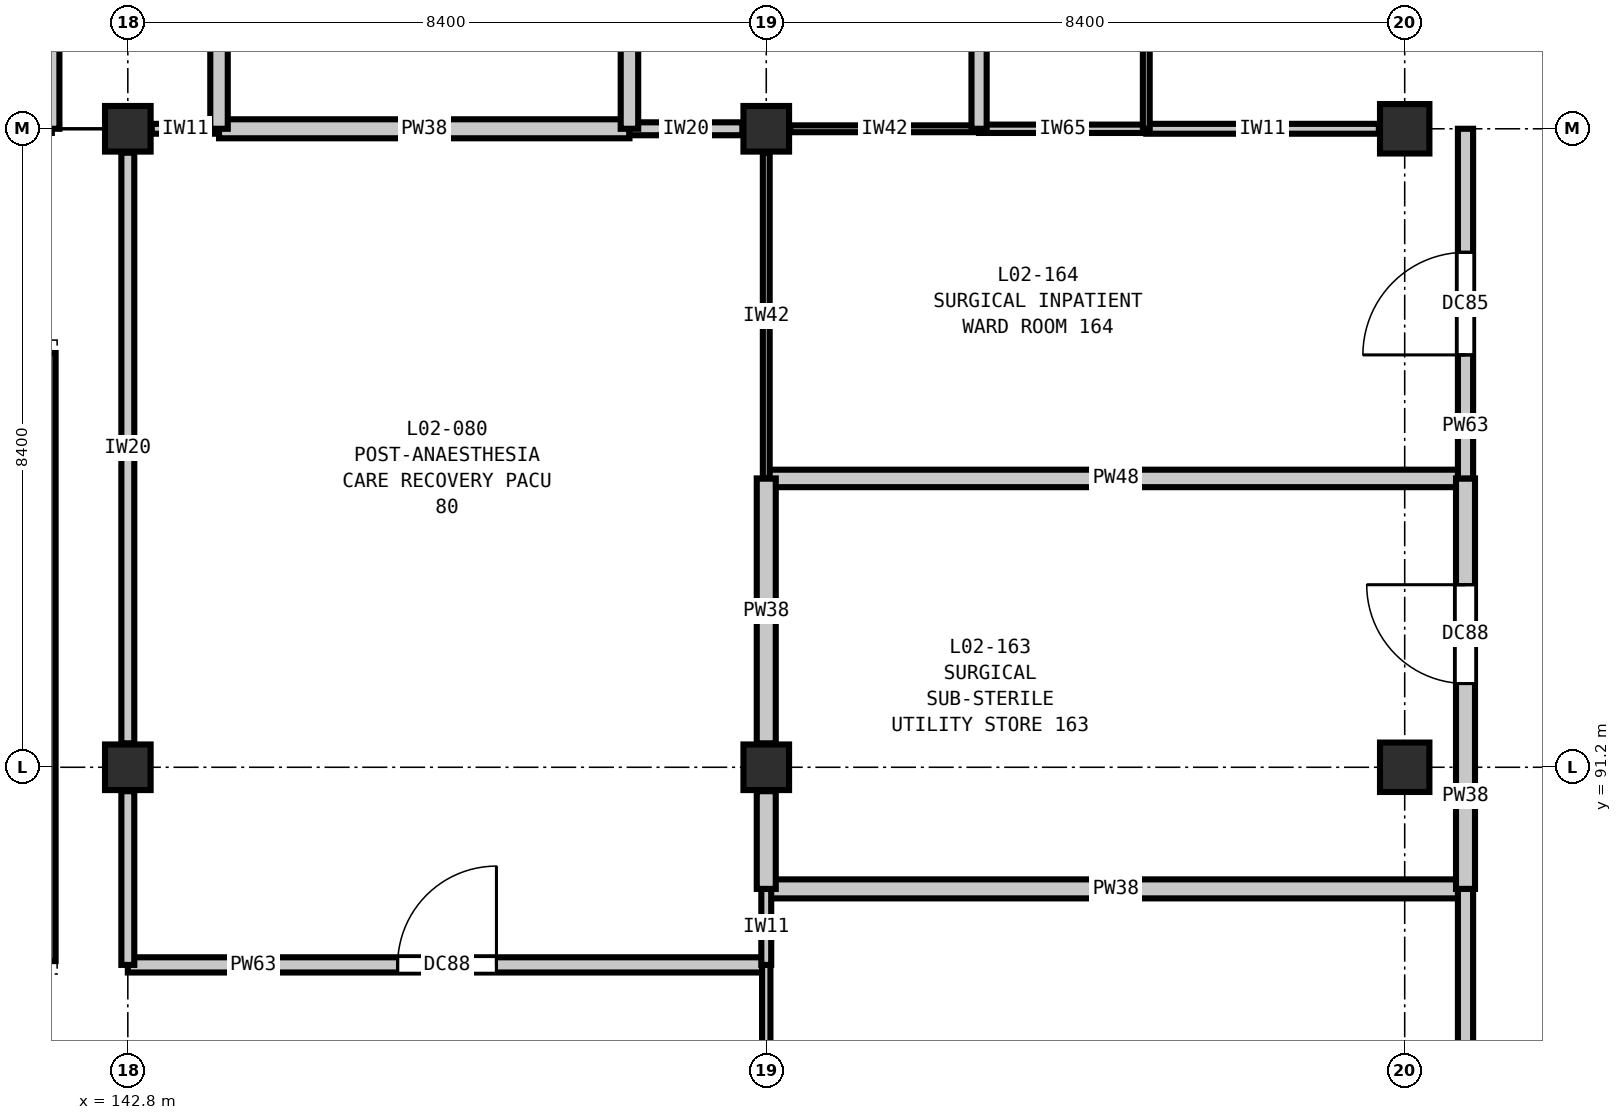
"""IFC4 building model, lengths in metres.
Left out: names, types, materials, properties, quantities, classifications, styles, units other than length and angle.
Written with IfcOpenShell. Run it as: python <this file> out.ifc"""

import sys

from ifc_helpers import new_model, si_unit, direction, frame, frame_2d, origin, origin_2d, place, context, subcontext, project, spatial, rectangle, extrude, element, fill, save


model = new_model("IFC4")
c1 = context("Model", 3, precision=1e-05, world=origin(), true_north=direction((0.0, 1.0)))
c2 = subcontext(c1, "Body", "Model", "MODEL_VIEW")
j1 = project(units=[si_unit("LENGTHUNIT", "METRE"), si_unit("PLANEANGLEUNIT", "RADIAN")], contexts=[c1])
p1 = place(None, origin())
s1 = spatial("IfcSite", under=j1, at=p1, CompositionType="ELEMENT")
p2 = place(p1, origin())
s2 = spatial("IfcBuilding", under=s1, at=p2, CompositionType="ELEMENT")
p3 = place(p2, frame((0.0, 0.0, 10.8)))
s3 = spatial("IfcBuildingStorey", under=s2, at=p3, CompositionType="ELEMENT", Elevation=10.8)
for number, where, z_axis, x_axis in (
    (1, (142.8, 91.2, 0.0), (0.0, 0.0, 1.0), (1.0, 0.0, 0.0)),
    (2, (142.8, 99.6, 0.0), (0.0, 0.0, 1.0), (1.0, 0.0, 0.0)),
    (3, (151.2, 91.2, 0.0), (0.0, 0.0, 1.0), (1.0, 0.0, 0.0)),
    (4, (151.2, 99.6, 0.0), (0.0, 0.0, 1.0), (1.0, 0.0, 0.0)),
):
    element("IfcColumn", number, at=place(p3, frame(where, z_axis=z_axis, x_axis=x_axis)), inside=s3, PredefinedType="COLUMN", context=c2, shape_type="SweptSolid", body=[
        extrude(rectangle(XDim=0.6, YDim=0.6, at=origin_2d()), origin(), (0.0, 0.0, 1.0), 5.4),
    ])
for number, where, z_axis, x_axis in (
    (5, (159.6, 91.2, 0.0), (0.0, 0.0, 1.0), (1.0, 0.0, 0.0)),
    (6, (159.6, 99.6, 0.0), (0.0, 0.0, 1.0), (1.0, 0.0, 0.0)),
):
    element("IfcColumn", number, at=place(p3, frame(where, z_axis=z_axis, x_axis=x_axis)), inside=s3, PredefinedType="COLUMN", context=c2, shape_type="SweptSolid", body=[
        extrude(rectangle(XDim=0.65, YDim=0.65, at=origin_2d()), origin(), (0.0, 0.0, 1.0), 5.4),
    ])
p4 = place(p3, frame((141.7, 88.65, 0.0), z_axis=(0.0, 0.0, 1.0), x_axis=(0.0, 1.0, 0.0)))
e7 = element("IfcWall", 7, at=p4, inside=s3, PredefinedType="SHEAR", context=c2, shape_type="SweptSolid", body=[
    extrude(rectangle(XDim=8.0, YDim=0.3, at=frame_2d((4.0, 0.0))), origin(), (0.0, 0.0, 1.0), 5.4),
])
p5 = place(p3, frame((142.8, 88.6, 0.0), z_axis=(0.0, 0.0, 1.0), x_axis=(1.0, 0.0, 0.0)))
e8 = element("IfcWall", 8, at=p5, inside=s3, PredefinedType="PARTITIONING", context=c2, shape_type="SweptSolid", body=[
    extrude(rectangle(XDim=8.4, YDim=0.2, at=frame_2d((4.2, 0.0))), origin(), (0.0, 0.0, 1.0), 5.07),
])
p6 = place(p5, frame((3.55, 0.0, 0.0)))
e9 = element("IfcOpeningElement", 9, at=p6, cuts=e8, PredefinedType="OPENING", context=c2, shape_type="SweptSolid", body=[
    extrude(rectangle(XDim=1.3, YDim=2.2, at=frame_2d((0.65, 1.1))), frame((0.0, 0.11, 0.0), z_axis=(0.0, -1.0, 0.0), x_axis=(1.0, 0.0, 0.0)), (0.0, 0.0, 1.0), 0.22),
])
p7 = place(p3, frame((151.2, 89.6, 0.0), z_axis=(0.0, 0.0, 1.0), x_axis=(1.0, 0.0, 0.0)))
e10 = element("IfcWall", 10, at=p7, inside=s3, PredefinedType="PARTITIONING", context=c2, shape_type="SweptSolid", body=[
    extrude(rectangle(XDim=9.2, YDim=0.25, at=frame_2d((4.6, 0.0))), origin(), (0.0, 0.0, 1.0), 5.07),
])
p8 = place(p3, frame((151.2, 95.0, 0.0), z_axis=(0.0, 0.0, 1.0), x_axis=(1.0, 0.0, 0.0)))
e11 = element("IfcWall", 11, at=p8, inside=s3, PredefinedType="PARTITIONING", context=c2, shape_type="SweptSolid", body=[
    extrude(rectangle(XDim=9.2, YDim=0.23, at=frame_2d((4.6, 0.0))), origin(), (0.0, 0.0, 1.0), 5.07),
])
p9 = place(p3, frame((143.115, 99.6, 0.0), z_axis=(0.0, 0.0, 1.0), x_axis=(1.0, 0.0, 0.0)))
e12 = element("IfcWall", 12, at=p9, inside=s3, PredefinedType="PARTITIONING", context=c2, shape_type="SweptSolid", body=[
    extrude(rectangle(XDim=0.885, YDim=0.13, at=frame_2d((0.442, 0.0))), origin(), (0.0, 0.0, 1.0), 4.735),
])
p10 = place(p3, frame((144.0, 99.6, 0.0), z_axis=(0.0, 0.0, 1.0), x_axis=(1.0, 0.0, 0.0)))
e13 = element("IfcWall", 13, at=p10, inside=s3, PredefinedType="PARTITIONING", context=c2, shape_type="SweptSolid", body=[
    extrude(rectangle(XDim=5.4, YDim=0.25, at=frame_2d((2.7, 0.0))), origin(), (0.0, 0.0, 1.0), 4.735),
])
p11 = place(p3, frame((149.4, 99.6, 0.0), z_axis=(0.0, 0.0, 1.0), x_axis=(1.0, 0.0, 0.0)))
e14 = element("IfcWall", 14, at=p11, inside=s3, PredefinedType="PARTITIONING", context=c2, shape_type="SweptSolid", body=[
    extrude(rectangle(XDim=1.485, YDim=0.17, at=frame_2d((0.743, 0.0))), origin(), (0.0, 0.0, 1.0), 4.735),
])
p12 = place(p3, frame((151.515, 99.6, 0.0), z_axis=(0.0, 0.0, 1.0), x_axis=(1.0, 0.0, 0.0)))
e15 = element("IfcWall", 15, at=p12, inside=s3, PredefinedType="PARTITIONING", context=c2, shape_type="SweptSolid", body=[
    extrude(rectangle(XDim=2.485, YDim=0.09, at=frame_2d((1.243, 0.0))), origin(), (0.0, 0.0, 1.0), 4.735),
])
p13 = place(p3, frame((154.0, 99.6, 0.0), z_axis=(0.0, 0.0, 1.0), x_axis=(1.0, 0.0, 0.0)))
e16 = element("IfcWall", 16, at=p13, inside=s3, PredefinedType="PARTITIONING", context=c2, shape_type="SweptSolid", body=[
    extrude(rectangle(XDim=2.2, YDim=0.11, at=frame_2d((1.1, 0.0))), origin(), (0.0, 0.0, 1.0), 4.735),
])
p14 = place(p3, frame((156.2, 99.6, 0.0), z_axis=(0.0, 0.0, 1.0), x_axis=(1.0, 0.0, 0.0)))
e17 = element("IfcWall", 17, at=p14, inside=s3, PredefinedType="PARTITIONING", context=c2, shape_type="SweptSolid", body=[
    extrude(rectangle(XDim=3.06, YDim=0.13, at=frame_2d((1.53, 0.0))), origin(), (0.0, 0.0, 1.0), 4.735),
])
p15 = place(p3, frame((141.8, 99.6, 0.0), z_axis=(0.0, 0.0, 1.0), x_axis=(0.0, 1.0, 0.0)))
e18 = element("IfcWall", 18, at=p15, inside=s3, PredefinedType="PARTITIONING", context=c2, shape_type="SweptSolid", body=[
    extrude(rectangle(XDim=6.8, YDim=0.2, at=frame_2d((3.4, 0.0))), origin(), (0.0, 0.0, 1.0), 5.07),
])
p16 = place(p15, frame((3.936, 0.0, 0.0)))
e19 = element("IfcOpeningElement", 19, at=p16, cuts=e18, PredefinedType="OPENING", context=c2, shape_type="SweptSolid", body=[
    extrude(rectangle(XDim=1.7, YDim=2.3, at=frame_2d((0.85, 1.15))), frame((0.0, 0.11, 0.0), z_axis=(0.0, -1.0, 0.0), x_axis=(1.0, 0.0, 0.0)), (0.0, 0.0, 1.0), 0.22),
])
p17 = place(p3, frame((142.8, 91.515, 0.0), z_axis=(0.0, 0.0, 1.0), x_axis=(0.0, 1.0, 0.0)))
e20 = element("IfcWall", 20, at=p17, inside=s3, PredefinedType="PARTITIONING", context=c2, shape_type="SweptSolid", body=[
    extrude(rectangle(XDim=7.77, YDim=0.17, at=frame_2d((3.885, 0.0))), origin(), (0.0, 0.0, 1.0), 4.735),
])
p18 = place(p3, frame((142.8, 88.6, 0.0), z_axis=(0.0, 0.0, 1.0), x_axis=(0.0, 1.0, 0.0)))
e21 = element("IfcWall", 21, at=p18, inside=s3, PredefinedType="PARTITIONING", context=c2, shape_type="SweptSolid", body=[
    extrude(rectangle(XDim=2.285, YDim=0.17, at=frame_2d((1.143, 0.0))), origin(), (0.0, 0.0, 1.0), 4.735),
])
p19 = place(p3, frame((144.0, 99.6, 0.0), z_axis=(0.0, 0.0, 1.0), x_axis=(0.0, 1.0, 0.0)))
e22 = element("IfcWall", 22, at=p19, inside=s3, PredefinedType="PARTITIONING", context=c2, shape_type="SweptSolid", body=[
    extrude(rectangle(XDim=6.8, YDim=0.23, at=frame_2d((3.4, 0.0))), origin(), (0.0, 0.0, 1.0), 5.07),
])
p20 = place(p3, frame((149.4, 99.6, 0.0), z_axis=(0.0, 0.0, 1.0), x_axis=(0.0, 1.0, 0.0)))
e23 = element("IfcWall", 23, at=p20, inside=s3, PredefinedType="PARTITIONING", context=c2, shape_type="SweptSolid", body=[
    extrude(rectangle(XDim=13.6, YDim=0.23, at=frame_2d((6.8, 0.0))), origin(), (0.0, 0.0, 1.0), 5.07),
])
p21 = place(p3, frame((151.2, 85.8, 0.0), z_axis=(0.0, 0.0, 1.0), x_axis=(0.0, 1.0, 0.0)))
e24 = element("IfcWall", 24, at=p21, inside=s3, PredefinedType="PARTITIONING", context=c2, shape_type="SweptSolid", body=[
    extrude(rectangle(XDim=2.8, YDim=0.11, at=frame_2d((1.4, 0.0))), origin(), (0.0, 0.0, 1.0), 4.735),
])
p22 = place(p3, frame((151.2, 88.6, 0.0), z_axis=(0.0, 0.0, 1.0), x_axis=(0.0, 1.0, 0.0)))
e25 = element("IfcWall", 25, at=p22, inside=s3, PredefinedType="PARTITIONING", context=c2, shape_type="SweptSolid", body=[
    extrude(rectangle(XDim=1.0, YDim=0.13, at=frame_2d((0.5, 0.0))), origin(), (0.0, 0.0, 1.0), 4.735),
])
p23 = place(p3, frame((151.2, 91.515, 0.0), z_axis=(0.0, 0.0, 1.0), x_axis=(0.0, 1.0, 0.0)))
e26 = element("IfcWall", 26, at=p23, inside=s3, PredefinedType="PARTITIONING", context=c2, shape_type="SweptSolid", body=[
    extrude(rectangle(XDim=3.485, YDim=0.25, at=frame_2d((1.743, 0.0))), origin(), (0.0, 0.0, 1.0), 4.735),
])
p24 = place(p3, frame((151.2, 89.6, 0.0), z_axis=(0.0, 0.0, 1.0), x_axis=(0.0, 1.0, 0.0)))
e27 = element("IfcWall", 27, at=p24, inside=s3, PredefinedType="PARTITIONING", context=c2, shape_type="SweptSolid", body=[
    extrude(rectangle(XDim=1.285, YDim=0.25, at=frame_2d((0.643, 0.0))), origin(), (0.0, 0.0, 1.0), 4.735),
])
p25 = place(p3, frame((151.2, 95.0, 0.0), z_axis=(0.0, 0.0, 1.0), x_axis=(0.0, 1.0, 0.0)))
e28 = element("IfcWall", 28, at=p25, inside=s3, PredefinedType="PARTITIONING", context=c2, shape_type="SweptSolid", body=[
    extrude(rectangle(XDim=4.285, YDim=0.09, at=frame_2d((2.143, 0.0))), origin(), (0.0, 0.0, 1.0), 4.735),
])
p26 = place(p3, frame((154.0, 99.6, 0.0), z_axis=(0.0, 0.0, 1.0), x_axis=(0.0, 1.0, 0.0)))
e29 = element("IfcWall", 29, at=p26, inside=s3, PredefinedType="PARTITIONING", context=c2, shape_type="SweptSolid", body=[
    extrude(rectangle(XDim=6.8, YDim=0.2, at=frame_2d((3.4, 0.0))), origin(), (0.0, 0.0, 1.0), 5.07),
])
p27 = place(p26, frame((2.775, 0.0, 0.0)))
e30 = element("IfcOpeningElement", 30, at=p27, cuts=e29, PredefinedType="OPENING", context=c2, shape_type="SweptSolid", body=[
    extrude(rectangle(XDim=1.25, YDim=2.15, at=frame_2d((0.625, 1.075))), frame((0.0, 0.11, 0.0), z_axis=(0.0, -1.0, 0.0), x_axis=(1.0, 0.0, 0.0)), (0.0, 0.0, 1.0), 0.22),
])
p28 = place(p3, frame((156.2, 99.6, 0.0), z_axis=(0.0, 0.0, 1.0), x_axis=(0.0, 1.0, 0.0)))
e31 = element("IfcWall", 31, at=p28, inside=s3, PredefinedType="PARTITIONING", context=c2, shape_type="SweptSolid", body=[
    extrude(rectangle(XDim=6.8, YDim=0.09, at=frame_2d((3.4, 0.0))), origin(), (0.0, 0.0, 1.0), 5.07),
])
p29 = place(p3, frame((160.4, 82.8, 0.0), z_axis=(0.0, 0.0, 1.0), x_axis=(0.0, 1.0, 0.0)))
e32 = element("IfcWall", 32, at=p29, inside=s3, PredefinedType="PARTITIONING", context=c2, shape_type="SweptSolid", body=[
    extrude(rectangle(XDim=6.8, YDim=0.2, at=frame_2d((3.4, 0.0))), origin(), (0.0, 0.0, 1.0), 5.07),
])
p30 = place(p29, frame((2.775, 0.0, 0.0)))
e33 = element("IfcOpeningElement", 33, at=p30, cuts=e32, PredefinedType="OPENING", context=c2, shape_type="SweptSolid", body=[
    extrude(rectangle(XDim=1.25, YDim=2.15, at=frame_2d((0.625, 1.075))), frame((0.0, 0.11, 0.0), z_axis=(0.0, -1.0, 0.0), x_axis=(1.0, 0.0, 0.0)), (0.0, 0.0, 1.0), 0.22),
])
p31 = place(p3, frame((160.4, 89.6, 0.0), z_axis=(0.0, 0.0, 1.0), x_axis=(0.0, 1.0, 0.0)))
e34 = element("IfcWall", 34, at=p31, inside=s3, PredefinedType="PARTITIONING", context=c2, shape_type="SweptSolid", body=[
    extrude(rectangle(XDim=5.4, YDim=0.25, at=frame_2d((2.7, 0.0))), origin(), (0.0, 0.0, 1.0), 5.07),
])
p32 = place(p31, frame((2.702, 0.0, 0.0)))
e35 = element("IfcOpeningElement", 35, at=p32, cuts=e34, PredefinedType="OPENING", context=c2, shape_type="SweptSolid", body=[
    extrude(rectangle(XDim=1.3, YDim=2.2, at=frame_2d((0.65, 1.1))), frame((0.0, 0.135, 0.0), z_axis=(0.0, -1.0, 0.0), x_axis=(1.0, 0.0, 0.0)), (0.0, 0.0, 1.0), 0.27),
])
p33 = place(p3, frame((160.4, 95.0, 0.0), z_axis=(0.0, 0.0, 1.0), x_axis=(0.0, 1.0, 0.0)))
e36 = element("IfcWall", 36, at=p33, inside=s3, PredefinedType="PARTITIONING", context=c2, shape_type="SweptSolid", body=[
    extrude(rectangle(XDim=4.6, YDim=0.2, at=frame_2d((2.3, 0.0))), origin(), (0.0, 0.0, 1.0), 5.07),
])
p34 = place(p33, frame((1.625, 0.0, 0.0)))
e37 = element("IfcOpeningElement", 37, at=p34, cuts=e36, PredefinedType="OPENING", context=c2, shape_type="SweptSolid", body=[
    extrude(rectangle(XDim=1.35, YDim=2.2, at=frame_2d((0.675, 1.1))), frame((0.0, 0.11, 0.0), z_axis=(0.0, -1.0, 0.0), x_axis=(1.0, 0.0, 0.0)), (0.0, 0.0, 1.0), 0.22),
])
p35 = place(p6, origin())
e38 = element("IfcDoor", 38, at=p35, inside=s3, OperationType="SINGLE_SWING_RIGHT", PredefinedType="DOOR", context=c2, shape_type="SweptSolid", body=[
    extrude(rectangle(XDim=1.3, YDim=2.2, at=frame_2d((0.65, 1.1))), frame((0.0, 0.025, 0.0), z_axis=(0.0, -1.0, 0.0), x_axis=(1.0, 0.0, 0.0)), (0.0, 0.0, 1.0), 0.05),
])
fill(e9, e38)
p36 = place(p32, origin())
e39 = element("IfcDoor", 39, at=p36, inside=s3, OperationType="SINGLE_SWING_RIGHT", PredefinedType="DOOR", context=c2, shape_type="SweptSolid", body=[
    extrude(rectangle(XDim=1.3, YDim=2.2, at=frame_2d((0.65, 1.1))), frame((0.0, 0.025, 0.0), z_axis=(0.0, -1.0, 0.0), x_axis=(1.0, 0.0, 0.0)), (0.0, 0.0, 1.0), 0.05),
])
fill(e35, e39)
p37 = place(p34, origin())
e40 = element("IfcDoor", 40, at=p37, inside=s3, OperationType="SINGLE_SWING_LEFT", PredefinedType="DOOR", context=c2, shape_type="SweptSolid", body=[
    extrude(rectangle(XDim=1.35, YDim=2.2, at=frame_2d((0.675, 1.1))), frame((0.0, 0.025, 0.0), z_axis=(0.0, -1.0, 0.0), x_axis=(1.0, 0.0, 0.0)), (0.0, 0.0, 1.0), 0.05),
])
fill(e37, e40)
save(model, sys.argv[1])
